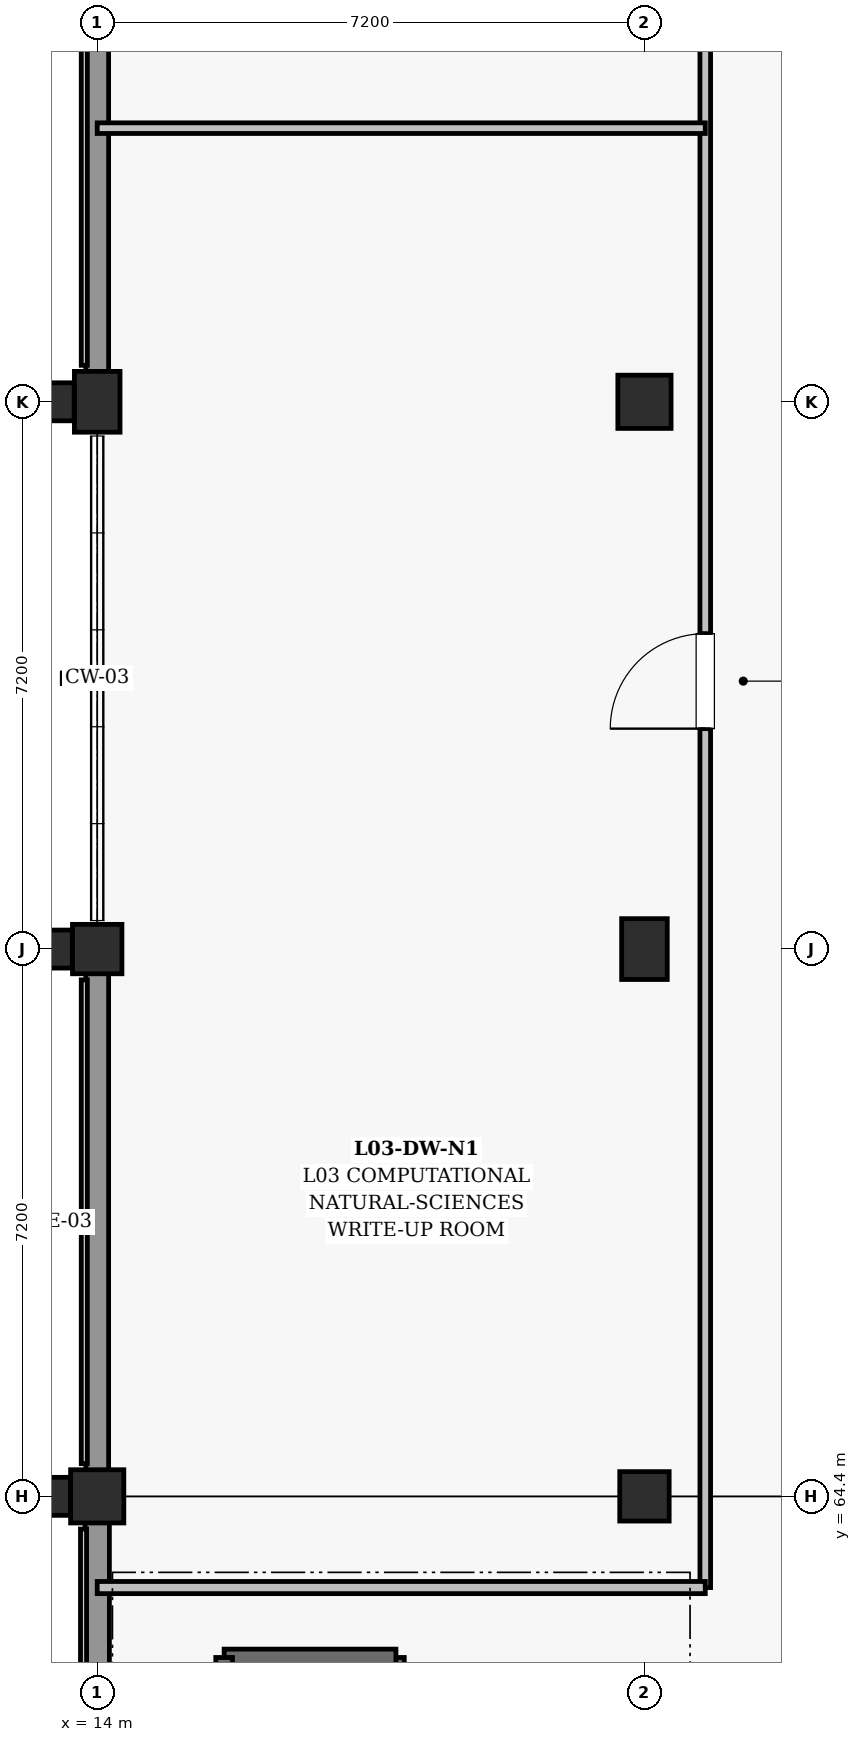
"""IFC4 building model, lengths in metres.
Left out: names, types, materials, properties, quantities, classifications, styles, units other than length and angle.
Written with IfcOpenShell. Run it as: python <this file> out.ifc"""

import sys

from ifc_helpers import new_model, si_unit, direction, frame, frame_2d, origin, origin_2d, place, context, subcontext, project, spatial, rectangle, extrude, element, fill, save


model = new_model("IFC4")
c1 = context("Model", 3, precision=1e-05, world=origin(), true_north=direction((0.0, 1.0)))
c2 = subcontext(c1, "Body", "Model", "MODEL_VIEW")
j1 = project(units=[si_unit("LENGTHUNIT", "METRE"), si_unit("PLANEANGLEUNIT", "RADIAN")], contexts=[c1])
p1 = place(None, origin())
s1 = spatial("IfcSite", under=j1, at=p1, CompositionType="ELEMENT")
p2 = place(p1, origin())
s2 = spatial("IfcBuilding", under=s1, at=p2, CompositionType="ELEMENT")
p3 = place(p2, frame((0.0, 0.0, 14.4)))
s3 = spatial("IfcBuildingStorey", under=s2, at=p3, CompositionType="ELEMENT", Elevation=14.4)
p4 = place(p3, frame((14.0, 64.4, 0.0), z_axis=(0.0, 0.0, 1.0), x_axis=(1.0, 0.0, 0.0)))
e1 = element("IfcColumn", 1, at=p4, inside=s3, PredefinedType="COLUMN", context=c2, shape_type="SweptSolid", body=[
    extrude(rectangle(XDim=0.7, YDim=0.7, at=origin_2d()), origin(), (0.0, 0.0, 1.0), 4.5),
])
p5 = place(p3, frame((14.0, 71.6, 0.0), z_axis=(0.0, 0.0, 1.0), x_axis=(1.0, 0.0, 0.0)))
e2 = element("IfcColumn", 2, at=p5, inside=s3, PredefinedType="COLUMN", context=c2, shape_type="SweptSolid", body=[
    extrude(rectangle(XDim=0.65, YDim=0.65, at=origin_2d()), origin(), (0.0, 0.0, 1.0), 4.5),
])
p6 = place(p3, frame((14.0, 78.8, 0.0), z_axis=(0.0, 0.0, 1.0), x_axis=(1.0, 0.0, 0.0)))
e3 = element("IfcColumn", 3, at=p6, inside=s3, PredefinedType="COLUMN", context=c2, shape_type="SweptSolid", body=[
    extrude(rectangle(XDim=0.6, YDim=0.8, at=origin_2d()), origin(), (0.0, 0.0, 1.0), 4.5),
])
p7 = place(p3, frame((21.2, 64.4, 0.0), z_axis=(0.0, 0.0, 1.0), x_axis=(1.0, 0.0, 0.0)))
e4 = element("IfcColumn", 4, at=p7, inside=s3, PredefinedType="COLUMN", context=c2, shape_type="SweptSolid", body=[
    extrude(rectangle(XDim=0.65, YDim=0.65, at=origin_2d()), origin(), (0.0, 0.0, 1.0), 4.5),
])
p8 = place(p3, frame((21.2, 71.6, 0.0), z_axis=(0.0, 0.0, 1.0), x_axis=(1.0, 0.0, 0.0)))
e5 = element("IfcColumn", 5, at=p8, inside=s3, PredefinedType="COLUMN", context=c2, shape_type="SweptSolid", body=[
    extrude(rectangle(XDim=0.6, YDim=0.8, at=origin_2d()), origin(), (0.0, 0.0, 1.0), 4.5),
])
p9 = place(p3, frame((21.2, 78.8, 0.0), z_axis=(0.0, 0.0, 1.0), x_axis=(1.0, 0.0, 0.0)))
e6 = element("IfcColumn", 6, at=p9, inside=s3, PredefinedType="COLUMN", context=c2, shape_type="SweptSolid", body=[
    extrude(rectangle(XDim=0.7, YDim=0.7, at=origin_2d()), origin(), (0.0, 0.0, 1.0), 4.5),
])
for number, where, z_axis, x_axis in (
    (7, (13.272, 64.4, 0.0), (0.0, 0.0, 1.0), (0.0, 1.0, 0.0)),
    (8, (13.297, 71.6, 0.0), (0.0, 0.0, 1.0), (0.0, 1.0, 0.0)),
    (9, (13.322, 78.8, 0.0), (0.0, 0.0, 1.0), (0.0, 1.0, 0.0)),
):
    element("IfcColumn", number, at=place(p3, frame(where, z_axis=z_axis, x_axis=x_axis)), inside=s3, PredefinedType="PILASTER", context=c2, shape_type="SweptSolid", body=[
        extrude(rectangle(XDim=0.5, YDim=0.75, at=origin_2d()), origin(), (0.0, 0.0, 1.0), 4.5),
    ])
p10 = place(p3, frame((14.0, 57.58, 0.0), z_axis=(0.0, 0.0, 1.0), x_axis=(0.0, 1.0, 0.0)))
e10 = element("IfcWall", 10, at=p10, inside=s3, PredefinedType="SOLIDWALL", context=c2, shape_type="SweptSolid", body=[
    extrude(rectangle(XDim=6.49, YDim=0.32, at=frame_2d((3.245, 0.0))), origin(), (0.0, 0.0, 1.0), 3.455),
])
p11 = place(p3, frame((14.0, 64.73, 0.0), z_axis=(0.0, 0.0, 1.0), x_axis=(0.0, 1.0, 0.0)))
e11 = element("IfcWall", 11, at=p11, inside=s3, PredefinedType="SOLIDWALL", context=c2, shape_type="SweptSolid", body=[
    extrude(rectangle(XDim=6.565, YDim=0.3, at=frame_2d((3.282, 0.0))), origin(), (0.0, 0.0, 1.0), 3.425),
])
p12 = place(p3, frame((14.0, 79.18, 0.0), z_axis=(0.0, 0.0, 1.0), x_axis=(0.0, 1.0, 0.0)))
e12 = element("IfcWall", 12, at=p12, inside=s3, PredefinedType="SOLIDWALL", context=c2, shape_type="SweptSolid", body=[
    extrude(rectangle(XDim=6.515, YDim=0.3, at=frame_2d((3.258, 0.0))), origin(), (0.0, 0.0, 1.0), 3.375),
])
p13 = place(p3, frame((17.93, 59.72, 0.0), z_axis=(0.0, 0.0, 1.0), x_axis=(0.0, 1.0, 0.0)))
e13 = element("IfcWall", 13, at=p13, inside=s3, PredefinedType="SHEAR", context=c2, shape_type="SweptSolid", body=[
    extrude(rectangle(XDim=2.56, YDim=0.22, at=frame_2d((1.28, 0.0))), origin(), (0.0, 0.0, 1.0), 4.195),
])
p14 = place(p13, frame((0.73, 0.0, 0.0)))
e14 = element("IfcOpeningElement", 14, at=p14, cuts=e13, PredefinedType="OPENING", context=c2, shape_type="SweptSolid", body=[
    extrude(rectangle(XDim=1.1, YDim=2.15, at=frame_2d((0.55, 1.075))), frame((0.0, 0.12, 0.0), z_axis=(0.0, -1.0, 0.0), x_axis=(1.0, 0.0, 0.0)), (0.0, 0.0, 1.0), 0.24),
])
p15 = place(p3, frame((17.93, 62.28, 0.0), z_axis=(0.0, 0.0, 1.0), x_axis=(-1.0, 0.0, 0.0)))
e15 = element("IfcWall", 15, at=p15, inside=s3, PredefinedType="SHEAR", context=c2, shape_type="SweptSolid", body=[
    extrude(rectangle(XDim=2.26, YDim=0.22, at=frame_2d((1.13, 0.0))), origin(), (0.0, 0.0, 1.0), 4.195),
])
p16 = place(p3, frame((15.67, 62.28, 0.0), z_axis=(0.0, 0.0, 1.0), x_axis=(0.0, -1.0, 0.0)))
e16 = element("IfcWall", 16, at=p16, inside=s3, PredefinedType="SHEAR", context=c2, shape_type="SweptSolid", body=[
    extrude(rectangle(XDim=2.56, YDim=0.22, at=frame_2d((1.28, 0.0))), origin(), (0.0, 0.0, 1.0), 4.195),
])
p17 = place(p3, frame((22.0, 63.2, 0.0), z_axis=(0.0, 0.0, 1.0), x_axis=(0.0, 1.0, 0.0)))
e17 = element("IfcWall", 17, at=p17, inside=s3, PredefinedType="PARTITIONING", context=c2, shape_type="SweptSolid", body=[
    extrude(rectangle(XDim=39.6, YDim=0.14, at=frame_2d((19.8, 0.0))), origin(), (0.0, 0.0, 1.0), 3.38),
])
p18 = place(p17, frame((11.3, 0.0, 0.0)))
e18 = element("IfcOpeningElement", 18, at=p18, cuts=e17, PredefinedType="OPENING", context=c2, shape_type="SweptSolid", body=[
    extrude(rectangle(XDim=1.25, YDim=2.2, at=frame_2d((0.625, 1.1))), frame((0.0, 0.08, 0.0), z_axis=(0.0, -1.0, 0.0), x_axis=(1.0, 0.0, 0.0)), (0.0, 0.0, 1.0), 0.16),
])
p19 = place(p17, frame((26.3, 0.0, 0.0)))
e19 = element("IfcOpeningElement", 19, at=p19, cuts=e17, PredefinedType="OPENING", context=c2, shape_type="SweptSolid", body=[
    extrude(rectangle(XDim=1.35, YDim=2.2, at=frame_2d((0.675, 1.1))), frame((0.0, 0.08, 0.0), z_axis=(0.0, -1.0, 0.0), x_axis=(1.0, 0.0, 0.0)), (0.0, 0.0, 1.0), 0.16),
])
p20 = place(p3, frame((14.0, 63.2, 0.0), z_axis=(0.0, 0.0, 1.0), x_axis=(1.0, 0.0, 0.0)))
e20 = element("IfcWall", 20, at=p20, inside=s3, PredefinedType="PARTITIONING", context=c2, shape_type="SweptSolid", body=[
    extrude(rectangle(XDim=8.0, YDim=0.16, at=frame_2d((4.0, 0.0))), origin(), (0.0, 0.0, 1.0), 3.58),
])
p21 = place(p3, frame((14.0, 82.4, 0.0), z_axis=(0.0, 0.0, 1.0), x_axis=(1.0, 0.0, 0.0)))
e21 = element("IfcWall", 21, at=p21, inside=s3, PredefinedType="PARTITIONING", context=c2, shape_type="SweptSolid", body=[
    extrude(rectangle(XDim=8.0, YDim=0.14, at=frame_2d((4.0, 0.0))), origin(), (0.0, 0.0, 1.0), 3.58),
])
p22 = place(p18, origin())
e22 = element("IfcDoor", 22, at=p22, inside=s3, OperationType="SINGLE_SWING_LEFT", PredefinedType="DOOR", context=c2, shape_type="SweptSolid", body=[
    extrude(rectangle(XDim=1.25, YDim=2.2, at=frame_2d((0.625, 1.1))), frame((0.0, 0.025, 0.0), z_axis=(0.0, -1.0, 0.0), x_axis=(1.0, 0.0, 0.0)), (0.0, 0.0, 1.0), 0.05),
])
fill(e18, e22)
save(model, sys.argv[1])
